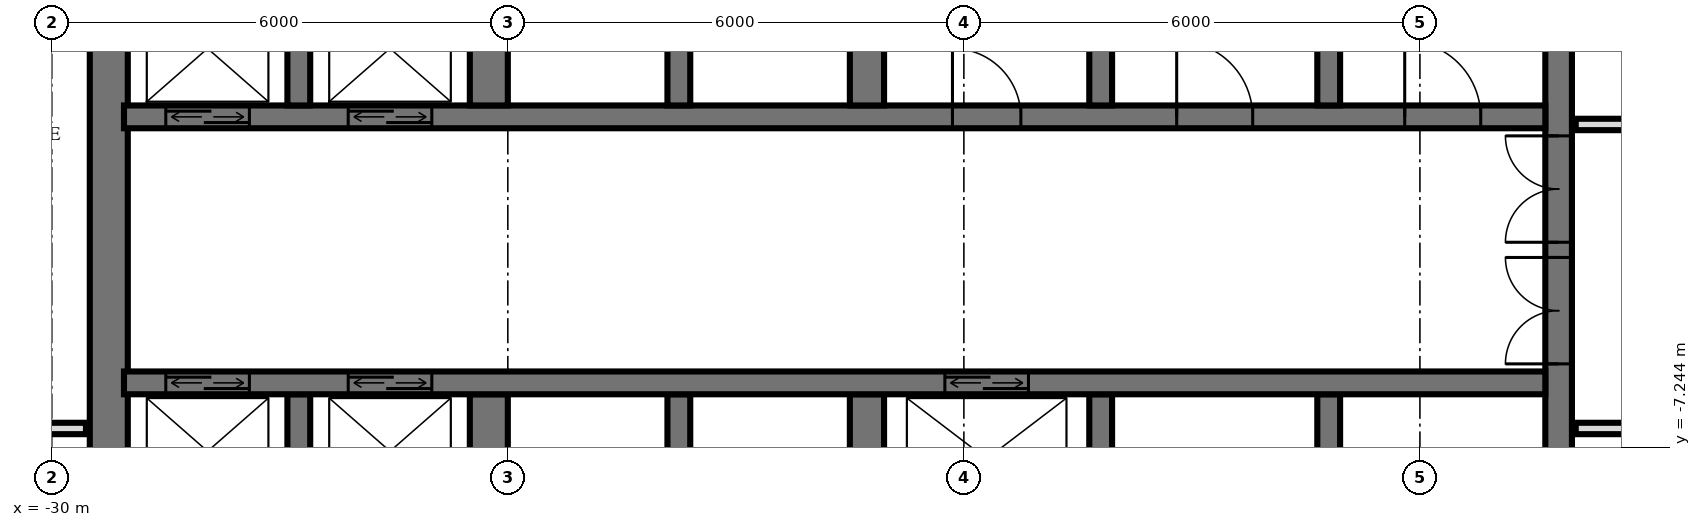
"""IFC4 building model, lengths in metres.
Left out: names, types, materials, properties, quantities, classifications, styles, units other than length and angle.
Written with IfcOpenShell. Run it as: python <this file> out.ifc"""

import sys

from ifc_helpers import new_model, si_unit, direction, frame, frame_2d, origin, place, context, subcontext, project, spatial, rectangle, extrude, element, fill, save


model = new_model("IFC4")
c1 = context("Model", 3, precision=1e-05, world=origin(), true_north=direction((0.0, 1.0)))
c2 = subcontext(c1, "Body", "Model", "MODEL_VIEW")
j1 = project(units=[si_unit("LENGTHUNIT", "METRE"), si_unit("PLANEANGLEUNIT", "RADIAN")], contexts=[c1])
p1 = place(None, origin())
s1 = spatial("IfcSite", under=j1, at=p1, CompositionType="ELEMENT")
p2 = place(p1, origin())
s2 = spatial("IfcBuilding", under=s1, at=p2, CompositionType="ELEMENT")
p3 = place(p2, frame((0.0, 0.0, 103.2)))
s3 = spatial("IfcBuildingStorey", under=s2, at=p3, CompositionType="ELEMENT", Elevation=103.2)
p4 = place(p3, frame((-10.175, -14.55, 0.0), z_axis=(0.0, 0.0, 1.0), x_axis=(0.0, 1.0, 0.0)))
e1 = element("IfcWall", 1, at=p4, inside=s3, PredefinedType="SHEAR", context=c2, shape_type="SweptSolid", body=[
    extrude(rectangle(XDim=14.1, YDim=0.35, at=frame_2d((7.05, 0.0))), origin(), (0.0, 0.0, 1.0), 3.6),
])
p5 = place(p4, frame((8.4, 0.0, 0.0)))
e2 = element("IfcOpeningElement", 2, at=p5, cuts=e1, PredefinedType="OPENING", context=c2, shape_type="SweptSolid", body=[
    extrude(rectangle(XDim=1.4, YDim=2.4, at=frame_2d((0.7, 1.2))), frame((0.0, 0.185, 0.0), z_axis=(0.0, -1.0, 0.0), x_axis=(1.0, 0.0, 0.0)), (0.0, 0.0, 1.0), 0.37),
])
p6 = place(p4, frame((10.0, 0.0, 0.0)))
e3 = element("IfcOpeningElement", 3, at=p6, cuts=e1, PredefinedType="OPENING", context=c2, shape_type="SweptSolid", body=[
    extrude(rectangle(XDim=1.4, YDim=2.4, at=frame_2d((0.7, 1.2))), frame((0.0, 0.185, 0.0), z_axis=(0.0, -1.0, 0.0), x_axis=(1.0, 0.0, 0.0)), (0.0, 0.0, 1.0), 0.37),
])
p7 = place(p4, frame((4.0, 0.0, 0.0)))
e4 = element("IfcOpeningElement", 4, at=p7, cuts=e1, PredefinedType="OPENING", context=c2, shape_type="SweptSolid", body=[
    extrude(rectangle(XDim=1.2, YDim=2.1, at=frame_2d((0.6, 1.05))), frame((0.0, 0.185, 0.0), z_axis=(0.0, -1.0, 0.0), x_axis=(1.0, 0.0, 0.0)), (0.0, 0.0, 1.0), 0.37),
])
p8 = place(p3, frame((-29.25, -14.55, 0.0), z_axis=(0.0, 0.0, 1.0), x_axis=(0.0, 1.0, 0.0)))
e5 = element("IfcWall", 5, at=p8, inside=s3, PredefinedType="SHEAR", context=c2, shape_type="SweptSolid", body=[
    extrude(rectangle(XDim=14.1, YDim=0.5, at=frame_2d((7.05, 0.0))), origin(), (0.0, 0.0, 1.0), 3.6),
])
p9 = place(p3, frame((-29.05, -2.9, 0.0), z_axis=(0.0, 0.0, 1.0), x_axis=(1.0, 0.0, 0.0)))
e6 = element("IfcWall", 6, at=p9, inside=s3, PredefinedType="SHEAR", context=c2, shape_type="SweptSolid", body=[
    extrude(rectangle(XDim=18.7, YDim=0.3, at=frame_2d((9.35, 0.0))), origin(), (0.0, 0.0, 1.0), 3.6),
])
p10 = place(p9, frame((2.95, 0.0, 0.0)))
e7 = element("IfcOpeningElement", 7, at=p10, cuts=e6, PredefinedType="OPENING", context=c2, shape_type="SweptSolid", body=[
    extrude(rectangle(XDim=1.1, YDim=2.1, at=frame_2d((0.55, 1.05))), frame((0.0, 0.16, 0.0), z_axis=(0.0, -1.0, 0.0), x_axis=(1.0, 0.0, 0.0)), (0.0, 0.0, 1.0), 0.32),
])
p11 = place(p9, frame((0.55, 0.0, 0.0)))
e8 = element("IfcOpeningElement", 8, at=p11, cuts=e6, PredefinedType="OPENING", context=c2, shape_type="SweptSolid", body=[
    extrude(rectangle(XDim=1.1, YDim=2.1, at=frame_2d((0.55, 1.05))), frame((0.0, 0.16, 0.0), z_axis=(0.0, -1.0, 0.0), x_axis=(1.0, 0.0, 0.0)), (0.0, 0.0, 1.0), 0.32),
])
p12 = place(p9, frame((10.9, 0.0, 0.0)))
e9 = element("IfcOpeningElement", 9, at=p12, cuts=e6, PredefinedType="OPENING", context=c2, shape_type="SweptSolid", body=[
    extrude(rectangle(XDim=0.9, YDim=2.1, at=frame_2d((0.45, 1.05))), frame((0.0, 0.16, 0.0), z_axis=(0.0, -1.0, 0.0), x_axis=(1.0, 0.0, 0.0)), (0.0, 0.0, 1.0), 0.32),
])
p13 = place(p9, frame((16.85, 0.0, 0.0)))
e10 = element("IfcOpeningElement", 10, at=p13, cuts=e6, PredefinedType="OPENING", context=c2, shape_type="SweptSolid", body=[
    extrude(rectangle(XDim=1.0, YDim=2.1, at=frame_2d((0.5, 1.05))), frame((0.0, 0.16, 0.0), z_axis=(0.0, -1.0, 0.0), x_axis=(1.0, 0.0, 0.0)), (0.0, 0.0, 1.0), 0.32),
])
p14 = place(p9, frame((13.85, 0.0, 0.0)))
e11 = element("IfcOpeningElement", 11, at=p14, cuts=e6, PredefinedType="OPENING", context=c2, shape_type="SweptSolid", body=[
    extrude(rectangle(XDim=1.0, YDim=2.1, at=frame_2d((0.5, 1.05))), frame((0.0, 0.16, 0.0), z_axis=(0.0, -1.0, 0.0), x_axis=(1.0, 0.0, 0.0)), (0.0, 0.0, 1.0), 0.32),
])
p15 = place(p3, frame((-29.05, -6.4, 0.0), z_axis=(0.0, 0.0, 1.0), x_axis=(1.0, 0.0, 0.0)))
e12 = element("IfcWall", 12, at=p15, inside=s3, PredefinedType="SHEAR", context=c2, shape_type="SweptSolid", body=[
    extrude(rectangle(XDim=18.7, YDim=0.3, at=frame_2d((9.35, 0.0))), origin(), (0.0, 0.0, 1.0), 3.6),
])
p16 = place(p15, frame((2.95, 0.0, 0.0)))
e13 = element("IfcOpeningElement", 13, at=p16, cuts=e12, PredefinedType="OPENING", context=c2, shape_type="SweptSolid", body=[
    extrude(rectangle(XDim=1.1, YDim=2.1, at=frame_2d((0.55, 1.05))), frame((0.0, 0.16, 0.0), z_axis=(0.0, -1.0, 0.0), x_axis=(1.0, 0.0, 0.0)), (0.0, 0.0, 1.0), 0.32),
])
p17 = place(p15, frame((0.55, 0.0, 0.0)))
e14 = element("IfcOpeningElement", 14, at=p17, cuts=e12, PredefinedType="OPENING", context=c2, shape_type="SweptSolid", body=[
    extrude(rectangle(XDim=1.1, YDim=2.1, at=frame_2d((0.55, 1.05))), frame((0.0, 0.16, 0.0), z_axis=(0.0, -1.0, 0.0), x_axis=(1.0, 0.0, 0.0)), (0.0, 0.0, 1.0), 0.32),
])
p18 = place(p15, frame((10.8, 0.0, 0.0)))
e15 = element("IfcOpeningElement", 15, at=p18, cuts=e12, PredefinedType="OPENING", context=c2, shape_type="SweptSolid", body=[
    extrude(rectangle(XDim=1.1, YDim=2.1, at=frame_2d((0.55, 1.05))), frame((0.0, 0.16, 0.0), z_axis=(0.0, -1.0, 0.0), x_axis=(1.0, 0.0, 0.0)), (0.0, 0.0, 1.0), 0.32),
])
for number, where, z_axis, x_axis in (
    (16, (-13.2, -2.75, 0.0), (0.0, 0.0, 1.0), (0.0, 1.0, 0.0)),
    (17, (-13.2, -8.85, 0.0), (0.0, 0.0, 1.0), (0.0, 1.0, 0.0)),
    (18, (-16.2, -2.75, 0.0), (0.0, 0.0, 1.0), (0.0, 1.0, 0.0)),
    (19, (-16.2, -8.85, 0.0), (0.0, 0.0, 1.0), (0.0, 1.0, 0.0)),
):
    element("IfcWall", number, at=place(p3, frame(where, z_axis=z_axis, x_axis=x_axis)), inside=s3, PredefinedType="SHEAR", context=c2, shape_type="SweptSolid", body=[
        extrude(rectangle(XDim=2.3, YDim=0.3, at=frame_2d((1.15, 0.0))), origin(), (0.0, 0.0, 1.0), 3.6),
    ])
for number, where, z_axis, x_axis in (
    (20, (-19.275, -2.75, 0.0), (0.0, 0.0, 1.0), (0.0, 1.0, 0.0)),
    (21, (-19.275, -8.85, 0.0), (0.0, 0.0, 1.0), (0.0, 1.0, 0.0)),
):
    element("IfcWall", number, at=place(p3, frame(where, z_axis=z_axis, x_axis=x_axis)), inside=s3, PredefinedType="SHEAR", context=c2, shape_type="SweptSolid", body=[
        extrude(rectangle(XDim=2.3, YDim=0.45, at=frame_2d((1.15, 0.0))), origin(), (0.0, 0.0, 1.0), 3.6),
    ])
for number, where, z_axis, x_axis in (
    (22, (-21.75, -2.75, 0.0), (0.0, 0.0, 1.0), (0.0, 1.0, 0.0)),
    (23, (-21.75, -8.85, 0.0), (0.0, 0.0, 1.0), (0.0, 1.0, 0.0)),
):
    element("IfcWall", number, at=place(p3, frame(where, z_axis=z_axis, x_axis=x_axis)), inside=s3, PredefinedType="SHEAR", context=c2, shape_type="SweptSolid", body=[
        extrude(rectangle(XDim=2.3, YDim=0.3, at=frame_2d((1.15, 0.0))), origin(), (0.0, 0.0, 1.0), 3.6),
    ])
for number, where, z_axis, x_axis in (
    (24, (-24.25, -2.75, 0.0), (0.0, 0.0, 1.0), (0.0, 1.0, 0.0)),
    (25, (-24.25, -8.85, 0.0), (0.0, 0.0, 1.0), (0.0, 1.0, 0.0)),
):
    element("IfcWall", number, at=place(p3, frame(where, z_axis=z_axis, x_axis=x_axis)), inside=s3, PredefinedType="SHEAR", context=c2, shape_type="SweptSolid", body=[
        extrude(rectangle(XDim=2.3, YDim=0.5, at=frame_2d((1.15, 0.0))), origin(), (0.0, 0.0, 1.0), 3.6),
    ])
for number, where, z_axis, x_axis in (
    (26, (-26.75, -2.75, 0.0), (0.0, 0.0, 1.0), (0.0, 1.0, 0.0)),
    (27, (-26.75, -8.85, 0.0), (0.0, 0.0, 1.0), (0.0, 1.0, 0.0)),
):
    element("IfcWall", number, at=place(p3, frame(where, z_axis=z_axis, x_axis=x_axis)), inside=s3, PredefinedType="SHEAR", context=c2, shape_type="SweptSolid", body=[
        extrude(rectangle(XDim=2.3, YDim=0.3, at=frame_2d((1.15, 0.0))), origin(), (0.0, 0.0, 1.0), 3.6),
    ])
p19 = place(p3, frame((-9.95, -7.0, 0.0), z_axis=(0.0, 0.0, 1.0), x_axis=(1.0, 0.0, 0.0)))
e28 = element("IfcWall", 28, at=p19, inside=s3, PredefinedType="PARTITIONING", context=c2, shape_type="SweptSolid", body=[
    extrude(rectangle(XDim=19.9, YDim=0.15, at=frame_2d((9.95, 0.0))), origin(), (0.0, 0.0, 1.0), 3.32),
])
p20 = place(p19, frame((9.45, 0.0, 0.0)))
e29 = element("IfcOpeningElement", 29, at=p20, cuts=e28, PredefinedType="OPENING", context=c2, shape_type="SweptSolid", body=[
    extrude(rectangle(XDim=1.0, YDim=2.1, at=frame_2d((0.5, 1.05))), frame((0.0, 0.085, 0.0), z_axis=(0.0, -1.0, 0.0), x_axis=(1.0, 0.0, 0.0)), (0.0, 0.0, 1.0), 0.17),
])
p21 = place(p19, frame((15.45, 0.0, 0.0)))
e30 = element("IfcOpeningElement", 30, at=p21, cuts=e28, PredefinedType="OPENING", context=c2, shape_type="SweptSolid", body=[
    extrude(rectangle(XDim=1.0, YDim=2.1, at=frame_2d((0.5, 1.05))), frame((0.0, 0.085, 0.0), z_axis=(0.0, -1.0, 0.0), x_axis=(1.0, 0.0, 0.0)), (0.0, 0.0, 1.0), 0.17),
])
p22 = place(p3, frame((-33.12, -7.0, 0.0), z_axis=(0.0, 0.0, 1.0), x_axis=(1.0, 0.0, 0.0)))
e31 = element("IfcWall", 31, at=p22, inside=s3, PredefinedType="PARTITIONING", context=c2, shape_type="SweptSolid", body=[
    extrude(rectangle(XDim=3.57, YDim=0.15, at=frame_2d((1.785, 0.0))), origin(), (0.0, 0.0, 1.0), 3.32),
])
p23 = place(p22, frame((1.27, 0.0, 0.0)))
e32 = element("IfcOpeningElement", 32, at=p23, cuts=e31, PredefinedType="OPENING", context=c2, shape_type="SweptSolid", body=[
    extrude(rectangle(XDim=0.9, YDim=2.1, at=frame_2d((0.45, 1.05))), frame((0.0, 0.085, 0.0), z_axis=(0.0, -1.0, 0.0), x_axis=(1.0, 0.0, 0.0)), (0.0, 0.0, 1.0), 0.17),
])
p24 = place(p3, frame((-9.95, -3.0, 0.0), z_axis=(0.0, 0.0, 1.0), x_axis=(1.0, 0.0, 0.0)))
e33 = element("IfcWall", 33, at=p24, inside=s3, PredefinedType="PARTITIONING", context=c2, shape_type="SweptSolid", body=[
    extrude(rectangle(XDim=19.9, YDim=0.15, at=frame_2d((9.95, 0.0))), origin(), (0.0, 0.0, 1.0), 3.32),
])
p25 = place(p24, frame((3.45, 0.0, 0.0)))
e34 = element("IfcOpeningElement", 34, at=p25, cuts=e33, PredefinedType="OPENING", context=c2, shape_type="SweptSolid", body=[
    extrude(rectangle(XDim=1.0, YDim=2.1, at=frame_2d((0.5, 1.05))), frame((0.0, 0.085, 0.0), z_axis=(0.0, -1.0, 0.0), x_axis=(1.0, 0.0, 0.0)), (0.0, 0.0, 1.0), 0.17),
])
p26 = place(p24, frame((8.95, 0.0, 0.0)))
e35 = element("IfcOpeningElement", 35, at=p26, cuts=e33, PredefinedType="OPENING", context=c2, shape_type="SweptSolid", body=[
    extrude(rectangle(XDim=1.0, YDim=2.1, at=frame_2d((0.5, 1.05))), frame((0.0, 0.085, 0.0), z_axis=(0.0, -1.0, 0.0), x_axis=(1.0, 0.0, 0.0)), (0.0, 0.0, 1.0), 0.17),
])
p27 = place(p24, frame((11.7, 0.0, 0.0)))
e36 = element("IfcOpeningElement", 36, at=p27, cuts=e33, PredefinedType="OPENING", context=c2, shape_type="SweptSolid", body=[
    extrude(rectangle(XDim=1.0, YDim=2.1, at=frame_2d((0.5, 1.05))), frame((0.0, 0.085, 0.0), z_axis=(0.0, -1.0, 0.0), x_axis=(1.0, 0.0, 0.0)), (0.0, 0.0, 1.0), 0.17),
])
p28 = place(p24, frame((16.2, 0.0, 0.0)))
e37 = element("IfcOpeningElement", 37, at=p28, cuts=e33, PredefinedType="OPENING", context=c2, shape_type="SweptSolid", body=[
    extrude(rectangle(XDim=1.0, YDim=2.1, at=frame_2d((0.5, 1.05))), frame((0.0, 0.085, 0.0), z_axis=(0.0, -1.0, 0.0), x_axis=(1.0, 0.0, 0.0)), (0.0, 0.0, 1.0), 0.17),
])
p29 = place(p10, origin())
e38 = element("IfcDoor", 38, at=p29, inside=s3, OperationType="DOUBLE_DOOR_SLIDING", PredefinedType="USERDEFINED", context=c2, shape_type="SweptSolid", body=[
    extrude(rectangle(XDim=1.1, YDim=2.1, at=frame_2d((0.55, 1.05))), frame((0.0, 0.025, 0.0), z_axis=(0.0, -1.0, 0.0), x_axis=(1.0, 0.0, 0.0)), (0.0, 0.0, 1.0), 0.05),
])
fill(e7, e38)
p30 = place(p11, origin())
e39 = element("IfcDoor", 39, at=p30, inside=s3, OperationType="DOUBLE_DOOR_SLIDING", PredefinedType="USERDEFINED", context=c2, shape_type="SweptSolid", body=[
    extrude(rectangle(XDim=1.1, YDim=2.1, at=frame_2d((0.55, 1.05))), frame((0.0, 0.025, 0.0), z_axis=(0.0, -1.0, 0.0), x_axis=(1.0, 0.0, 0.0)), (0.0, 0.0, 1.0), 0.05),
])
fill(e8, e39)
p31 = place(p16, origin())
e40 = element("IfcDoor", 40, at=p31, inside=s3, OperationType="DOUBLE_DOOR_SLIDING", PredefinedType="USERDEFINED", context=c2, shape_type="SweptSolid", body=[
    extrude(rectangle(XDim=1.1, YDim=2.1, at=frame_2d((0.55, 1.05))), frame((0.0, 0.025, 0.0), z_axis=(0.0, -1.0, 0.0), x_axis=(1.0, 0.0, 0.0)), (0.0, 0.0, 1.0), 0.05),
])
fill(e13, e40)
p32 = place(p17, origin())
e41 = element("IfcDoor", 41, at=p32, inside=s3, OperationType="DOUBLE_DOOR_SLIDING", PredefinedType="USERDEFINED", context=c2, shape_type="SweptSolid", body=[
    extrude(rectangle(XDim=1.1, YDim=2.1, at=frame_2d((0.55, 1.05))), frame((0.0, 0.025, 0.0), z_axis=(0.0, -1.0, 0.0), x_axis=(1.0, 0.0, 0.0)), (0.0, 0.0, 1.0), 0.05),
])
fill(e14, e41)
p33 = place(p18, origin())
e42 = element("IfcDoor", 42, at=p33, inside=s3, OperationType="DOUBLE_DOOR_SLIDING", PredefinedType="USERDEFINED", context=c2, shape_type="SweptSolid", body=[
    extrude(rectangle(XDim=1.1, YDim=2.1, at=frame_2d((0.55, 1.05))), frame((0.0, 0.025, 0.0), z_axis=(0.0, -1.0, 0.0), x_axis=(1.0, 0.0, 0.0)), (0.0, 0.0, 1.0), 0.05),
])
fill(e15, e42)
p34 = place(p5, origin())
e43 = element("IfcDoor", 43, at=p34, inside=s3, OperationType="DOUBLE_DOOR_SINGLE_SWING", PredefinedType="DOOR", context=c2, shape_type="SweptSolid", body=[
    extrude(rectangle(XDim=1.4, YDim=2.4, at=frame_2d((0.7, 1.2))), frame((0.0, 0.025, 0.0), z_axis=(0.0, -1.0, 0.0), x_axis=(1.0, 0.0, 0.0)), (0.0, 0.0, 1.0), 0.05),
])
fill(e2, e43)
p35 = place(p6, origin())
e44 = element("IfcDoor", 44, at=p35, inside=s3, OperationType="DOUBLE_DOOR_SINGLE_SWING", PredefinedType="DOOR", context=c2, shape_type="SweptSolid", body=[
    extrude(rectangle(XDim=1.4, YDim=2.4, at=frame_2d((0.7, 1.2))), frame((0.0, 0.025, 0.0), z_axis=(0.0, -1.0, 0.0), x_axis=(1.0, 0.0, 0.0)), (0.0, 0.0, 1.0), 0.05),
])
fill(e3, e44)
p36 = place(p12, origin())
e45 = element("IfcDoor", 45, at=p36, inside=s3, OperationType="SINGLE_SWING_RIGHT", PredefinedType="DOOR", context=c2, shape_type="SweptSolid", body=[
    extrude(rectangle(XDim=0.9, YDim=2.1, at=frame_2d((0.45, 1.05))), frame((0.0, 0.025, 0.0), z_axis=(0.0, -1.0, 0.0), x_axis=(1.0, 0.0, 0.0)), (0.0, 0.0, 1.0), 0.05),
])
fill(e9, e45)
p37 = place(p13, origin())
e46 = element("IfcDoor", 46, at=p37, inside=s3, OperationType="SINGLE_SWING_RIGHT", PredefinedType="DOOR", context=c2, shape_type="SweptSolid", body=[
    extrude(rectangle(XDim=1.0, YDim=2.1, at=frame_2d((0.5, 1.05))), frame((0.0, 0.025, 0.0), z_axis=(0.0, -1.0, 0.0), x_axis=(1.0, 0.0, 0.0)), (0.0, 0.0, 1.0), 0.05),
])
fill(e10, e46)
p38 = place(p14, origin())
e47 = element("IfcDoor", 47, at=p38, inside=s3, OperationType="SINGLE_SWING_RIGHT", PredefinedType="DOOR", context=c2, shape_type="SweptSolid", body=[
    extrude(rectangle(XDim=1.0, YDim=2.1, at=frame_2d((0.5, 1.05))), frame((0.0, 0.025, 0.0), z_axis=(0.0, -1.0, 0.0), x_axis=(1.0, 0.0, 0.0)), (0.0, 0.0, 1.0), 0.05),
])
fill(e11, e47)
save(model, sys.argv[1])
